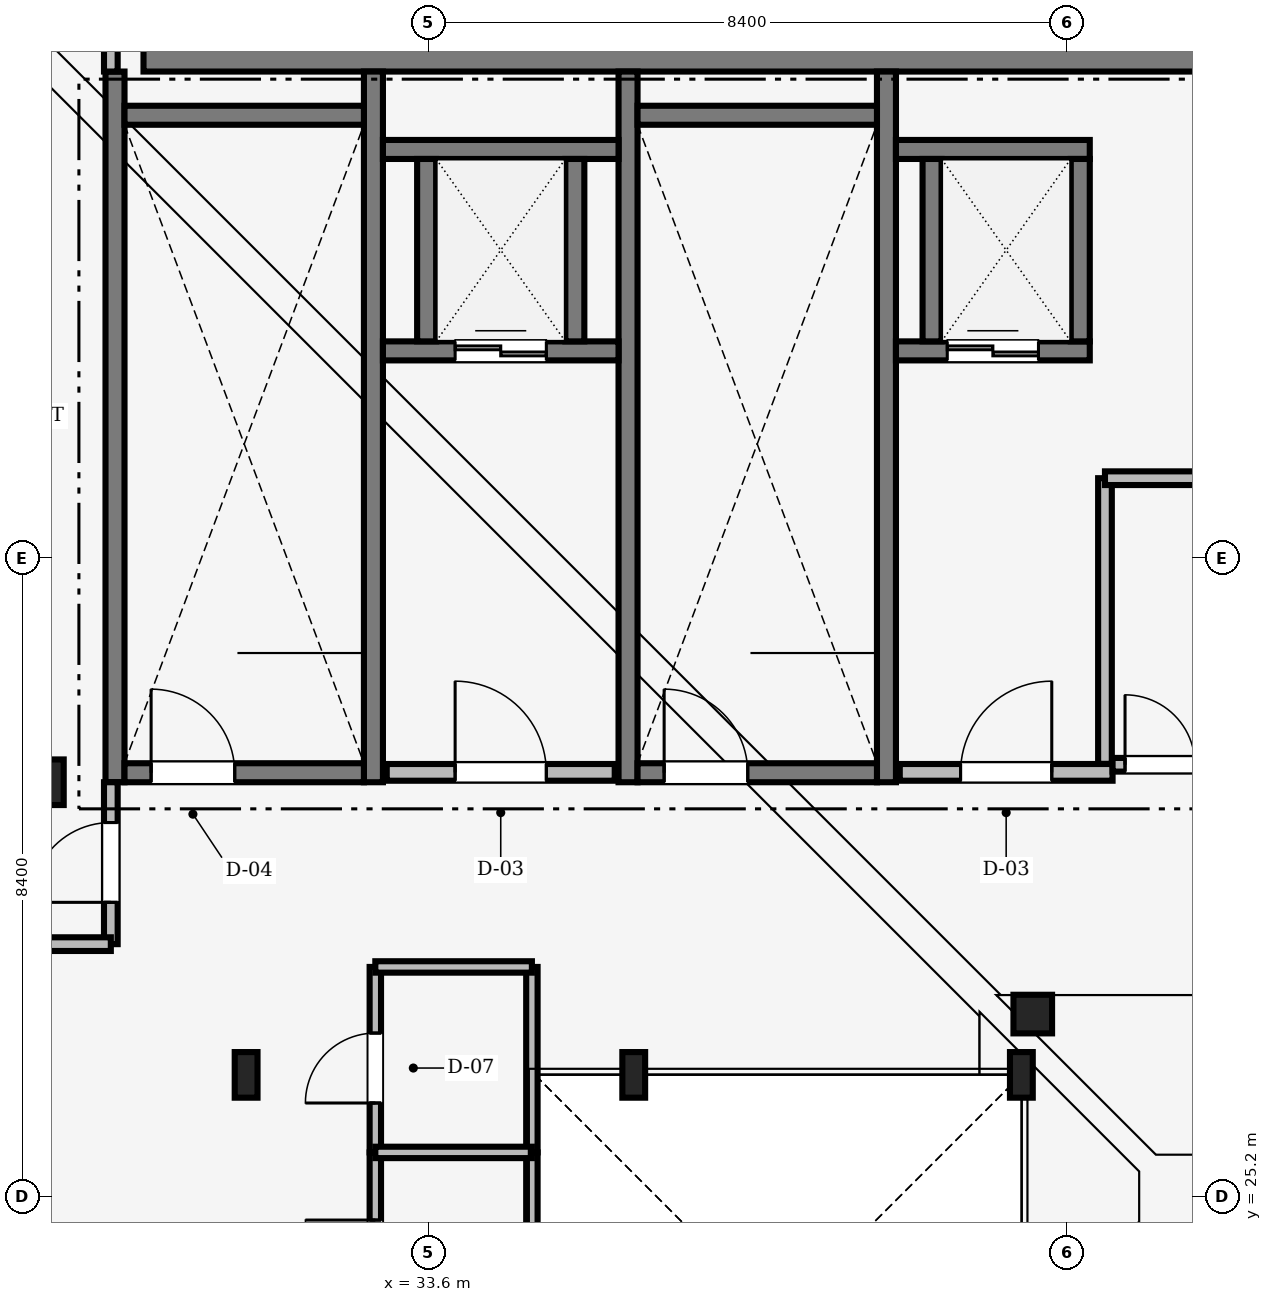
"""IFC4 building model, lengths in metres.
Left out: names, types, materials, properties, quantities, classifications, styles, units other than length and angle.
Written with IfcOpenShell. Run it as: python <this file> out.ifc"""

import sys

from ifc_helpers import new_model, si_unit, direction, frame, frame_2d, origin, origin_2d, place, context, subcontext, project, spatial, rectangle, hollow_circle, i_section, extrude, source, transform, mapped, element, fill, save


model = new_model("IFC4")
c1 = context("Model", 3, precision=1e-05, world=origin(), true_north=direction((0.0, 1.0)))
c2 = subcontext(c1, "Body", "Model", "MODEL_VIEW")
j1 = project(units=[si_unit("LENGTHUNIT", "METRE"), si_unit("PLANEANGLEUNIT", "RADIAN")], contexts=[c1])
p1 = place(None, origin())
s1 = spatial("IfcSite", under=j1, at=p1, CompositionType="ELEMENT")
p2 = place(p1, origin())
s2 = spatial("IfcBuilding", under=s1, at=p2, CompositionType="ELEMENT")
p3 = place(p2, frame((0.0, 0.0, 301.15)))
s3 = spatial("IfcBuildingStorey", under=s2, at=p3, CompositionType="ELEMENT", Elevation=301.15)
m1 = source(origin(), c2, "Body", "SweptSolid", [
    extrude(rectangle(XDim=17.52, YDim=0.6, at=frame_2d((8.76, 0.0))), origin(), (0.0, 0.0, 1.0), 4.7),
])
p4 = place(p3, frame((29.85, 40.3, 0.0), z_axis=(0.0, 0.0, 1.0), x_axis=(1.0, 0.0, 0.0)))
e1 = element("IfcWall", 1, at=p4, inside=s3, PredefinedType="SHEAR", context=c2, shape_type="MappedRepresentation", body=[
    mapped(m1, transform((0.0, 0.0, 0.0), scale=1.0)),
])
m2 = source(origin(), c2, "Body", "SweptSolid", [
    extrude(i_section(OverallWidth=0.3, OverallDepth=0.6, WebThickness=0.015, FlangeThickness=0.03, FilletRadius=0.027, at=origin_2d()), origin(), (0.0, 0.0, 1.0), 4.6),
])
for number, where, z_axis, x_axis in (
    (2, (41.4, 26.8, 0.0), (0.0, 0.0, 1.0), (1.0, 0.0, 0.0)),
    (3, (36.3, 26.8, 0.0), (0.0, 0.0, 1.0), (1.0, 0.0, 0.0)),
    (4, (31.2, 26.8, 0.0), (0.0, 0.0, 1.0), (1.0, 0.0, 0.0)),
    (5, (28.65, 30.65, 0.0), (0.0, 0.0, 1.0), (1.0, 0.0, 0.0)),
):
    element("IfcColumn", number, at=place(p3, frame(where, z_axis=z_axis, x_axis=x_axis)), inside=s3, PredefinedType="COLUMN", context=c2, shape_type="MappedRepresentation", body=[
        mapped(m2, transform((0.0, 0.0, 0.0), scale=1.0)),
    ])
m3 = source(origin(), c2, "Body", "SweptSolid", [
    extrude(hollow_circle(Radius=0.254, WallThickness=0.025, at=origin_2d()), origin(), (0.0, 0.0, 1.0), 17.12),
])
p5 = place(p3, frame((41.55, 27.6, 4.6), z_axis=(0.0, 0.0, 1.0), x_axis=(1.0, 0.0, 0.0)))
e6 = element("IfcColumn", 6, at=p5, inside=s3, PredefinedType="COLUMN", context=c2, shape_type="MappedRepresentation", body=[
    mapped(m3, transform((0.0, 0.0, 0.0), scale=1.0)),
])
m4 = source(origin(), c2, "Body", "SweptSolid", [
    extrude(rectangle(XDim=9.35, YDim=0.25, at=frame_2d((4.675, 0.0))), origin(), (0.0, 0.0, 1.0), 4.6),
])
for number, where, z_axis, x_axis in (
    (7, (29.475, 30.65, 0.0), (0.0, 0.0, 1.0), (0.0, 1.0, 0.0)),
    (8, (32.875, 30.65, 0.0), (0.0, 0.0, 1.0), (0.0, 1.0, 0.0)),
):
    element("IfcWall", number, at=place(p3, frame(where, z_axis=z_axis, x_axis=x_axis)), inside=s3, PredefinedType="SOLIDWALL", context=c2, shape_type="MappedRepresentation", body=[
        mapped(m4, transform((0.0, 0.0, 0.0), scale=1.0)),
    ])
m5 = source(origin(), c2, "Body", "SweptSolid", [
    extrude(rectangle(XDim=3.15, YDim=0.25, at=frame_2d((1.575, 0.0))), origin(), (0.0, 0.0, 1.0), 4.6),
])
p6 = place(p3, frame((29.6, 39.425, 0.0), z_axis=(0.0, 0.0, 1.0), x_axis=(1.0, 0.0, 0.0)))
e9 = element("IfcWall", 9, at=p6, inside=s3, PredefinedType="SOLIDWALL", context=c2, shape_type="MappedRepresentation", body=[
    mapped(m5, transform((0.0, 0.0, 0.0), scale=1.0)),
])
p7 = place(p3, frame((29.6, 30.775, 0.0), z_axis=(0.0, 0.0, 1.0), x_axis=(1.0, 0.0, 0.0)))
e10 = element("IfcWall", 10, at=p7, inside=s3, PredefinedType="SOLIDWALL", context=c2, shape_type="MappedRepresentation", body=[
    mapped(m5, transform((0.0, 0.0, 0.0), scale=1.0)),
])
m6 = source(origin(), c2, "Body", "SweptSolid", [
    extrude(rectangle(XDim=1.1, YDim=2.2, at=frame_2d((0.55, 1.1))), frame((0.0, 0.135, 0.0), z_axis=(0.0, -1.0, 0.0), x_axis=(1.0, 0.0, 0.0)), (0.0, 0.0, 1.0), 0.27),
])
p8 = place(p7, frame((0.35, 0.0, 0.0)))
e11 = element("IfcOpeningElement", 11, at=p8, cuts=e10, PredefinedType="OPENING", context=c2, shape_type="MappedRepresentation", body=[
    mapped(m6, transform((0.0, 0.0, 0.0), scale=1.0)),
])
for number, where, z_axis, x_axis in (
    (12, (36.225, 30.65, 0.0), (0.0, 0.0, 1.0), (0.0, 1.0, 0.0)),
    (13, (39.625, 30.65, 0.0), (0.0, 0.0, 1.0), (0.0, 1.0, 0.0)),
):
    element("IfcWall", number, at=place(p3, frame(where, z_axis=z_axis, x_axis=x_axis)), inside=s3, PredefinedType="SOLIDWALL", context=c2, shape_type="MappedRepresentation", body=[
        mapped(m4, transform((0.0, 0.0, 0.0), scale=1.0)),
    ])
p9 = place(p3, frame((36.35, 39.425, 0.0), z_axis=(0.0, 0.0, 1.0), x_axis=(1.0, 0.0, 0.0)))
e14 = element("IfcWall", 14, at=p9, inside=s3, PredefinedType="SOLIDWALL", context=c2, shape_type="MappedRepresentation", body=[
    mapped(m5, transform((0.0, 0.0, 0.0), scale=1.0)),
])
p10 = place(p3, frame((36.35, 30.775, 0.0), z_axis=(0.0, 0.0, 1.0), x_axis=(1.0, 0.0, 0.0)))
e15 = element("IfcWall", 15, at=p10, inside=s3, PredefinedType="SOLIDWALL", context=c2, shape_type="MappedRepresentation", body=[
    mapped(m5, transform((0.0, 0.0, 0.0), scale=1.0)),
])
p11 = place(p10, frame((0.35, 0.0, 0.0)))
e16 = element("IfcOpeningElement", 16, at=p11, cuts=e15, PredefinedType="OPENING", context=c2, shape_type="MappedRepresentation", body=[
    mapped(m6, transform((0.0, 0.0, 0.0), scale=1.0)),
])
m7 = source(origin(), c2, "Body", "SweptSolid", [
    extrude(rectangle(XDim=3.0, YDim=0.22, at=frame_2d((1.5, 0.0))), origin(), (0.0, 0.0, 1.0), 4.6),
])
p12 = place(p3, frame((33.05, 30.78, 0.0), z_axis=(0.0, 0.0, 1.0), x_axis=(1.0, 0.0, 0.0)))
e17 = element("IfcWall", 17, at=p12, inside=s3, PredefinedType="SOLIDWALL", context=c2, shape_type="MappedRepresentation", body=[
    mapped(m7, transform((0.0, 0.0, 0.0), scale=1.0)),
])
m8 = source(origin(), c2, "Body", "SweptSolid", [
    extrude(rectangle(XDim=1.2, YDim=2.2, at=frame_2d((0.6, 1.1))), frame((0.0, 0.12, 0.0), z_axis=(0.0, -1.0, 0.0), x_axis=(1.0, 0.0, 0.0)), (0.0, 0.0, 1.0), 0.24),
])
p13 = place(p12, frame((0.9, 0.0, 0.0)))
e18 = element("IfcOpeningElement", 18, at=p13, cuts=e17, PredefinedType="OPENING", context=c2, shape_type="MappedRepresentation", body=[
    mapped(m8, transform((0.0, 0.0, 0.0), scale=1.0)),
])
m9 = source(origin(), c2, "Body", "SweptSolid", [
    extrude(rectangle(XDim=2.8, YDim=0.22, at=frame_2d((1.4, 0.0))), origin(), (0.0, 0.0, 1.0), 4.6),
])
p14 = place(p3, frame((39.8, 30.78, 0.0), z_axis=(0.0, 0.0, 1.0), x_axis=(1.0, 0.0, 0.0)))
e19 = element("IfcWall", 19, at=p14, inside=s3, PredefinedType="SOLIDWALL", context=c2, shape_type="MappedRepresentation", body=[
    mapped(m9, transform((0.0, 0.0, 0.0), scale=1.0)),
])
p15 = place(p14, frame((0.8, 0.0, 0.0)))
e20 = element("IfcOpeningElement", 20, at=p15, cuts=e19, PredefinedType="OPENING", context=c2, shape_type="MappedRepresentation", body=[
    mapped(m8, transform((0.0, 0.0, 0.0), scale=1.0)),
])
m10 = source(origin(), c2, "Body", "SweptSolid", [
    extrude(rectangle(XDim=3.1, YDim=0.25, at=frame_2d((1.55, 0.0))), origin(), (0.0, 0.0, 1.0), 4.6),
])
p16 = place(p3, frame((33.0, 36.325, 0.0), z_axis=(0.0, 0.0, 1.0), x_axis=(1.0, 0.0, 0.0)))
e21 = element("IfcWall", 21, at=p16, inside=s3, PredefinedType="SOLIDWALL", context=c2, shape_type="MappedRepresentation", body=[
    mapped(m10, transform((0.0, 0.0, 0.0), scale=1.0)),
])
m11 = source(origin(), c2, "Body", "SweptSolid", [
    extrude(rectangle(XDim=1.2, YDim=2.25, at=frame_2d((0.6, 1.125))), frame((0.0, 0.135, 0.0), z_axis=(0.0, -1.0, 0.0), x_axis=(1.0, 0.0, 0.0)), (0.0, 0.0, 1.0), 0.27),
])
p17 = place(p16, frame((0.95, 0.0, 0.0)))
e22 = element("IfcOpeningElement", 22, at=p17, cuts=e21, PredefinedType="OPENING", context=c2, shape_type="MappedRepresentation", body=[
    mapped(m11, transform((0.0, 0.0, 0.0), scale=1.0)),
])
p18 = place(p3, frame((33.0, 38.975, 0.0), z_axis=(0.0, 0.0, 1.0), x_axis=(1.0, 0.0, 0.0)))
e23 = element("IfcWall", 23, at=p18, inside=s3, PredefinedType="SOLIDWALL", context=c2, shape_type="MappedRepresentation", body=[
    mapped(m10, transform((0.0, 0.0, 0.0), scale=1.0)),
])
m12 = source(origin(), c2, "Body", "SweptSolid", [
    extrude(rectangle(XDim=2.4, YDim=0.25, at=frame_2d((1.2, 0.0))), origin(), (0.0, 0.0, 1.0), 4.6),
])
for number, where, z_axis, x_axis in (
    (24, (33.575, 36.45, 0.0), (0.0, 0.0, 1.0), (0.0, 1.0, 0.0)),
    (25, (35.525, 36.45, 0.0), (0.0, 0.0, 1.0), (0.0, 1.0, 0.0)),
):
    element("IfcWall", number, at=place(p3, frame(where, z_axis=z_axis, x_axis=x_axis)), inside=s3, PredefinedType="SOLIDWALL", context=c2, shape_type="MappedRepresentation", body=[
        mapped(m12, transform((0.0, 0.0, 0.0), scale=1.0)),
    ])
m13 = source(origin(), c2, "Body", "SweptSolid", [
    extrude(rectangle(XDim=2.55, YDim=0.25, at=frame_2d((1.275, 0.0))), origin(), (0.0, 0.0, 1.0), 4.6),
])
p19 = place(p3, frame((39.75, 36.325, 0.0), z_axis=(0.0, 0.0, 1.0), x_axis=(1.0, 0.0, 0.0)))
e26 = element("IfcWall", 26, at=p19, inside=s3, PredefinedType="SOLIDWALL", context=c2, shape_type="MappedRepresentation", body=[
    mapped(m13, transform((0.0, 0.0, 0.0), scale=1.0)),
])
p20 = place(p19, frame((0.675, 0.0, 0.0)))
e27 = element("IfcOpeningElement", 27, at=p20, cuts=e26, PredefinedType="OPENING", context=c2, shape_type="MappedRepresentation", body=[
    mapped(m11, transform((0.0, 0.0, 0.0), scale=1.0)),
])
p21 = place(p3, frame((39.75, 38.975, 0.0), z_axis=(0.0, 0.0, 1.0), x_axis=(1.0, 0.0, 0.0)))
e28 = element("IfcWall", 28, at=p21, inside=s3, PredefinedType="SOLIDWALL", context=c2, shape_type="MappedRepresentation", body=[
    mapped(m13, transform((0.0, 0.0, 0.0), scale=1.0)),
])
for number, where, z_axis, x_axis in (
    (29, (40.225, 36.45, 0.0), (0.0, 0.0, 1.0), (0.0, 1.0, 0.0)),
    (30, (42.175, 36.45, 0.0), (0.0, 0.0, 1.0), (0.0, 1.0, 0.0)),
):
    element("IfcWall", number, at=place(p3, frame(where, z_axis=z_axis, x_axis=x_axis)), inside=s3, PredefinedType="SOLIDWALL", context=c2, shape_type="MappedRepresentation", body=[
        mapped(m12, transform((0.0, 0.0, 0.0), scale=1.0)),
    ])
m14 = source(origin(), c2, "Body", "SweptSolid", [
    extrude(rectangle(XDim=2.13, YDim=0.18, at=frame_2d((1.065, 0.0))), origin(), (0.0, 0.0, 1.0), 4.6),
])
p22 = place(p3, frame((29.42, 28.52, 0.0), z_axis=(0.0, 0.0, 1.0), x_axis=(0.0, 1.0, 0.0)))
e31 = element("IfcWall", 31, at=p22, inside=s3, PredefinedType="PARTITIONING", context=c2, shape_type="MappedRepresentation", body=[
    mapped(m14, transform((0.0, 0.0, 0.0), scale=1.0)),
])
m15 = source(origin(), c2, "Body", "SweptSolid", [
    extrude(rectangle(XDim=1.05, YDim=2.2, at=frame_2d((0.525, 1.1))), frame((0.0, 0.1, 0.0), z_axis=(0.0, -1.0, 0.0), x_axis=(1.0, 0.0, 0.0)), (0.0, 0.0, 1.0), 0.2),
])
p23 = place(p22, frame((0.55, 0.0, 0.0)))
e32 = element("IfcOpeningElement", 32, at=p23, cuts=e31, PredefinedType="OPENING", context=c2, shape_type="MappedRepresentation", body=[
    mapped(m15, transform((0.0, 0.0, 0.0), scale=1.0)),
])
m16 = source(origin(), c2, "Body", "SweptSolid", [
    extrude(rectangle(XDim=2.322, YDim=0.18, at=frame_2d((1.161, 0.0))), origin(), (0.0, 0.0, 1.0), 4.6),
])
p24 = place(p3, frame((29.42, 40.0, 0.0), z_axis=(0.0, 0.0, 1.0), x_axis=(0.0, 1.0, 0.0)))
e33 = element("IfcWall", 33, at=p24, inside=s3, PredefinedType="PARTITIONING", context=c2, shape_type="MappedRepresentation", body=[
    mapped(m16, transform((0.0, 0.0, 0.0), scale=1.0)),
])
m17 = source(origin(), c2, "Body", "SweptSolid", [
    extrude(rectangle(XDim=2.46, YDim=0.15, at=frame_2d((1.23, 0.0))), origin(), (0.0, 0.0, 1.0), 4.6),
])
p25 = place(p3, frame((32.9, 23.32, 0.0), z_axis=(0.0, 0.0, 1.0), x_axis=(0.0, 1.0, 0.0)))
e34 = element("IfcWall", 34, at=p25, inside=s3, PredefinedType="PARTITIONING", context=c2, shape_type="MappedRepresentation", body=[
    mapped(m17, transform((0.0, 0.0, 0.0), scale=1.0)),
])
m18 = source(origin(), c2, "Body", "SweptSolid", [
    extrude(rectangle(XDim=0.92, YDim=2.1, at=frame_2d((0.46, 1.05))), frame((0.0, 0.085, 0.0), z_axis=(0.0, -1.0, 0.0), x_axis=(1.0, 0.0, 0.0)), (0.0, 0.0, 1.0), 0.17),
])
p26 = place(p25, frame((0.65, 0.0, 0.0)))
e35 = element("IfcOpeningElement", 35, at=p26, cuts=e34, PredefinedType="OPENING", context=c2, shape_type="MappedRepresentation", body=[
    mapped(m18, transform((0.0, 0.0, 0.0), scale=1.0)),
])
m19 = source(origin(), c2, "Body", "SweptSolid", [
    extrude(rectangle(XDim=2.44, YDim=0.15, at=frame_2d((1.22, 0.0))), origin(), (0.0, 0.0, 1.0), 4.6),
])
p27 = place(p3, frame((32.9, 25.78, 0.0), z_axis=(0.0, 0.0, 1.0), x_axis=(0.0, 1.0, 0.0)))
e36 = element("IfcWall", 36, at=p27, inside=s3, PredefinedType="PARTITIONING", context=c2, shape_type="MappedRepresentation", body=[
    mapped(m19, transform((0.0, 0.0, 0.0), scale=1.0)),
])
p28 = place(p27, frame((0.65, 0.0, 0.0)))
e37 = element("IfcOpeningElement", 37, at=p28, cuts=e36, PredefinedType="OPENING", context=c2, shape_type="MappedRepresentation", body=[
    mapped(m18, transform((0.0, 0.0, 0.0), scale=1.0)),
])
m20 = source(origin(), c2, "Body", "SweptSolid", [
    extrude(rectangle(XDim=1.248, YDim=0.18, at=frame_2d((0.624, 0.0))), origin(), (0.0, 0.0, 1.0), 4.6),
])
p29 = place(p3, frame((42.6, 30.88, 0.0), z_axis=(0.0, 0.0, 1.0), x_axis=(1.0, 0.0, 0.0)))
e38 = element("IfcWall", 38, at=p29, inside=s3, PredefinedType="PARTITIONING", context=c2, shape_type="MappedRepresentation", body=[
    mapped(m20, transform((0.0, 0.0, 0.0), scale=1.0)),
])
m21 = source(origin(), c2, "Body", "SweptSolid", [
    extrude(rectangle(XDim=0.92, YDim=2.1, at=frame_2d((0.46, 1.05))), frame((0.0, 0.1, 0.0), z_axis=(0.0, -1.0, 0.0), x_axis=(1.0, 0.0, 0.0)), (0.0, 0.0, 1.0), 0.2),
])
p30 = place(p29, frame((0.164, 0.0, 0.0)))
e39 = element("IfcOpeningElement", 39, at=p30, cuts=e38, PredefinedType="OPENING", context=c2, shape_type="MappedRepresentation", body=[
    mapped(m21, transform((0.0, 0.0, 0.0), scale=1.0)),
])
m22 = source(origin(), c2, "Body", "SweptSolid", [
    extrude(rectangle(XDim=3.758, YDim=0.18, at=frame_2d((1.879, 0.0))), origin(), (0.0, 0.0, 1.0), 4.6),
])
p31 = place(p3, frame((42.5, 30.892, 0.0), z_axis=(0.0, 0.0, 1.0), x_axis=(0.0, 1.0, 0.0)))
e40 = element("IfcWall", 40, at=p31, inside=s3, PredefinedType="PARTITIONING", context=c2, shape_type="MappedRepresentation", body=[
    mapped(m22, transform((0.0, 0.0, 0.0), scale=1.0)),
])
m23 = source(origin(), c2, "Body", "SweptSolid", [
    extrude(rectangle(XDim=3.058, YDim=0.18, at=frame_2d((1.529, 0.0))), origin(), (0.0, 0.0, 1.0), 4.142),
])
p32 = place(p3, frame((26.362, 28.52, 0.0), z_axis=(0.0, 0.0, 1.0), x_axis=(1.0, 0.0, 0.0)))
e41 = element("IfcWall", 41, at=p32, inside=s3, PredefinedType="PARTITIONING", context=c2, shape_type="MappedRepresentation", body=[
    mapped(m23, transform((0.0, 0.0, 0.0), scale=1.0)),
])
p33 = place(p3, frame((34.96, 23.32, 0.0), z_axis=(0.0, 0.0, 1.0), x_axis=(0.0, 1.0, 0.0)))
e42 = element("IfcWall", 42, at=p33, inside=s3, PredefinedType="PARTITIONING", context=c2, shape_type="MappedRepresentation", body=[
    mapped(m17, transform((0.0, 0.0, 0.0), scale=1.0)),
])
p34 = place(p3, frame((34.96, 25.78, 0.0), z_axis=(0.0, 0.0, 1.0), x_axis=(0.0, 1.0, 0.0)))
e43 = element("IfcWall", 43, at=p34, inside=s3, PredefinedType="PARTITIONING", context=c2, shape_type="MappedRepresentation", body=[
    mapped(m19, transform((0.0, 0.0, 0.0), scale=1.0)),
])
m24 = source(origin(), c2, "Body", "SweptSolid", [
    extrude(rectangle(XDim=2.06, YDim=0.15, at=frame_2d((1.03, 0.0))), origin(), (0.0, 0.0, 1.0), 4.6),
])
for number, where, z_axis, x_axis in (
    (44, (32.9, 25.78, 0.0), (0.0, 0.0, 1.0), (1.0, 0.0, 0.0)),
    (45, (32.9, 28.22, 0.0), (0.0, 0.0, 1.0), (1.0, 0.0, 0.0)),
):
    element("IfcWall", number, at=place(p3, frame(where, z_axis=z_axis, x_axis=x_axis)), inside=s3, PredefinedType="PARTITIONING", context=c2, shape_type="MappedRepresentation", body=[
        mapped(m24, transform((0.0, 0.0, 0.0), scale=1.0)),
    ])
m25 = source(origin(), c2, "Body", "SweptSolid", [
    extrude(rectangle(XDim=1.348, YDim=0.18, at=frame_2d((0.674, 0.0))), origin(), (0.0, 0.0, 1.0), 4.6),
])
p35 = place(p3, frame((42.5, 34.65, 0.0), z_axis=(0.0, 0.0, 1.0), x_axis=(1.0, 0.0, 0.0)))
e46 = element("IfcWall", 46, at=p35, inside=s3, PredefinedType="PARTITIONING", context=c2, shape_type="MappedRepresentation", body=[
    mapped(m25, transform((0.0, 0.0, 0.0), scale=1.0)),
])
m26 = source(origin(), c2, "Body", "SweptSolid", [
    extrude(rectangle(XDim=1.1, YDim=2.2, at=frame_2d((0.55, 1.1))), frame((0.0, 0.025, 0.0), z_axis=(0.0, -1.0, 0.0), x_axis=(1.0, 0.0, 0.0)), (0.0, 0.0, 1.0), 0.05),
])
p36 = place(p8, origin())
e47 = element("IfcDoor", 47, at=p36, inside=s3, OperationType="SINGLE_SWING_LEFT", PredefinedType="DOOR", context=c2, shape_type="MappedRepresentation", body=[
    mapped(m26, transform((0.0, 0.0, 0.0), scale=1.0)),
])
fill(e11, e47)
p37 = place(p11, origin())
e48 = element("IfcDoor", 48, at=p37, inside=s3, OperationType="SINGLE_SWING_LEFT", PredefinedType="DOOR", context=c2, shape_type="MappedRepresentation", body=[
    mapped(m26, transform((0.0, 0.0, 0.0), scale=1.0)),
])
fill(e16, e48)
m27 = source(origin(), c2, "Body", "SweptSolid", [
    extrude(rectangle(XDim=1.2, YDim=2.2, at=frame_2d((0.6, 1.1))), frame((0.0, 0.025, 0.0), z_axis=(0.0, -1.0, 0.0), x_axis=(1.0, 0.0, 0.0)), (0.0, 0.0, 1.0), 0.05),
])
p38 = place(p13, origin())
e49 = element("IfcDoor", 49, at=p38, inside=s3, OperationType="SINGLE_SWING_LEFT", PredefinedType="DOOR", context=c2, shape_type="MappedRepresentation", body=[
    mapped(m27, transform((0.0, 0.0, 0.0), scale=1.0)),
])
fill(e18, e49)
p39 = place(p15, origin())
e50 = element("IfcDoor", 50, at=p39, inside=s3, OperationType="SINGLE_SWING_RIGHT", PredefinedType="DOOR", context=c2, shape_type="MappedRepresentation", body=[
    mapped(m27, transform((0.0, 0.0, 0.0), scale=1.0)),
])
fill(e20, e50)
m28 = source(origin(), c2, "Body", "SweptSolid", [
    extrude(rectangle(XDim=1.2, YDim=2.25, at=frame_2d((0.6, 1.125))), frame((0.0, 0.025, 0.0), z_axis=(0.0, -1.0, 0.0), x_axis=(1.0, 0.0, 0.0)), (0.0, 0.0, 1.0), 0.05),
])
p40 = place(p17, origin())
e51 = element("IfcDoor", 51, at=p40, inside=s3, OperationType="DOUBLE_DOOR_SLIDING", PredefinedType="DOOR", context=c2, shape_type="MappedRepresentation", body=[
    mapped(m28, transform((0.0, 0.0, 0.0), scale=1.0)),
])
fill(e22, e51)
p41 = place(p20, origin())
e52 = element("IfcDoor", 52, at=p41, inside=s3, OperationType="DOUBLE_DOOR_SLIDING", PredefinedType="DOOR", context=c2, shape_type="MappedRepresentation", body=[
    mapped(m28, transform((0.0, 0.0, 0.0), scale=1.0)),
])
fill(e27, e52)
m29 = source(origin(), c2, "Body", "SweptSolid", [
    extrude(rectangle(XDim=1.05, YDim=2.2, at=frame_2d((0.525, 1.1))), frame((0.0, 0.025, 0.0), z_axis=(0.0, -1.0, 0.0), x_axis=(1.0, 0.0, 0.0)), (0.0, 0.0, 1.0), 0.05),
])
p42 = place(p23, origin())
e53 = element("IfcDoor", 53, at=p42, inside=s3, OperationType="SINGLE_SWING_LEFT", PredefinedType="DOOR", context=c2, shape_type="MappedRepresentation", body=[
    mapped(m29, transform((0.0, 0.0, 0.0), scale=1.0)),
])
fill(e32, e53)
m30 = source(origin(), c2, "Body", "SweptSolid", [
    extrude(rectangle(XDim=0.92, YDim=2.1, at=frame_2d((0.46, 1.05))), frame((0.0, 0.025, 0.0), z_axis=(0.0, -1.0, 0.0), x_axis=(1.0, 0.0, 0.0)), (0.0, 0.0, 1.0), 0.05),
])
p43 = place(p26, origin())
e54 = element("IfcDoor", 54, at=p43, inside=s3, OperationType="SINGLE_SWING_RIGHT", PredefinedType="DOOR", context=c2, shape_type="MappedRepresentation", body=[
    mapped(m30, transform((0.0, 0.0, 0.0), scale=1.0)),
])
fill(e35, e54)
p44 = place(p28, origin())
e55 = element("IfcDoor", 55, at=p44, inside=s3, OperationType="SINGLE_SWING_LEFT", PredefinedType="DOOR", context=c2, shape_type="MappedRepresentation", body=[
    mapped(m30, transform((0.0, 0.0, 0.0), scale=1.0)),
])
fill(e37, e55)
p45 = place(p30, origin())
e56 = element("IfcDoor", 56, at=p45, inside=s3, OperationType="SINGLE_SWING_LEFT", PredefinedType="DOOR", context=c2, shape_type="MappedRepresentation", body=[
    mapped(m30, transform((0.0, 0.0, 0.0), scale=1.0)),
])
fill(e39, e56)
save(model, sys.argv[1])
